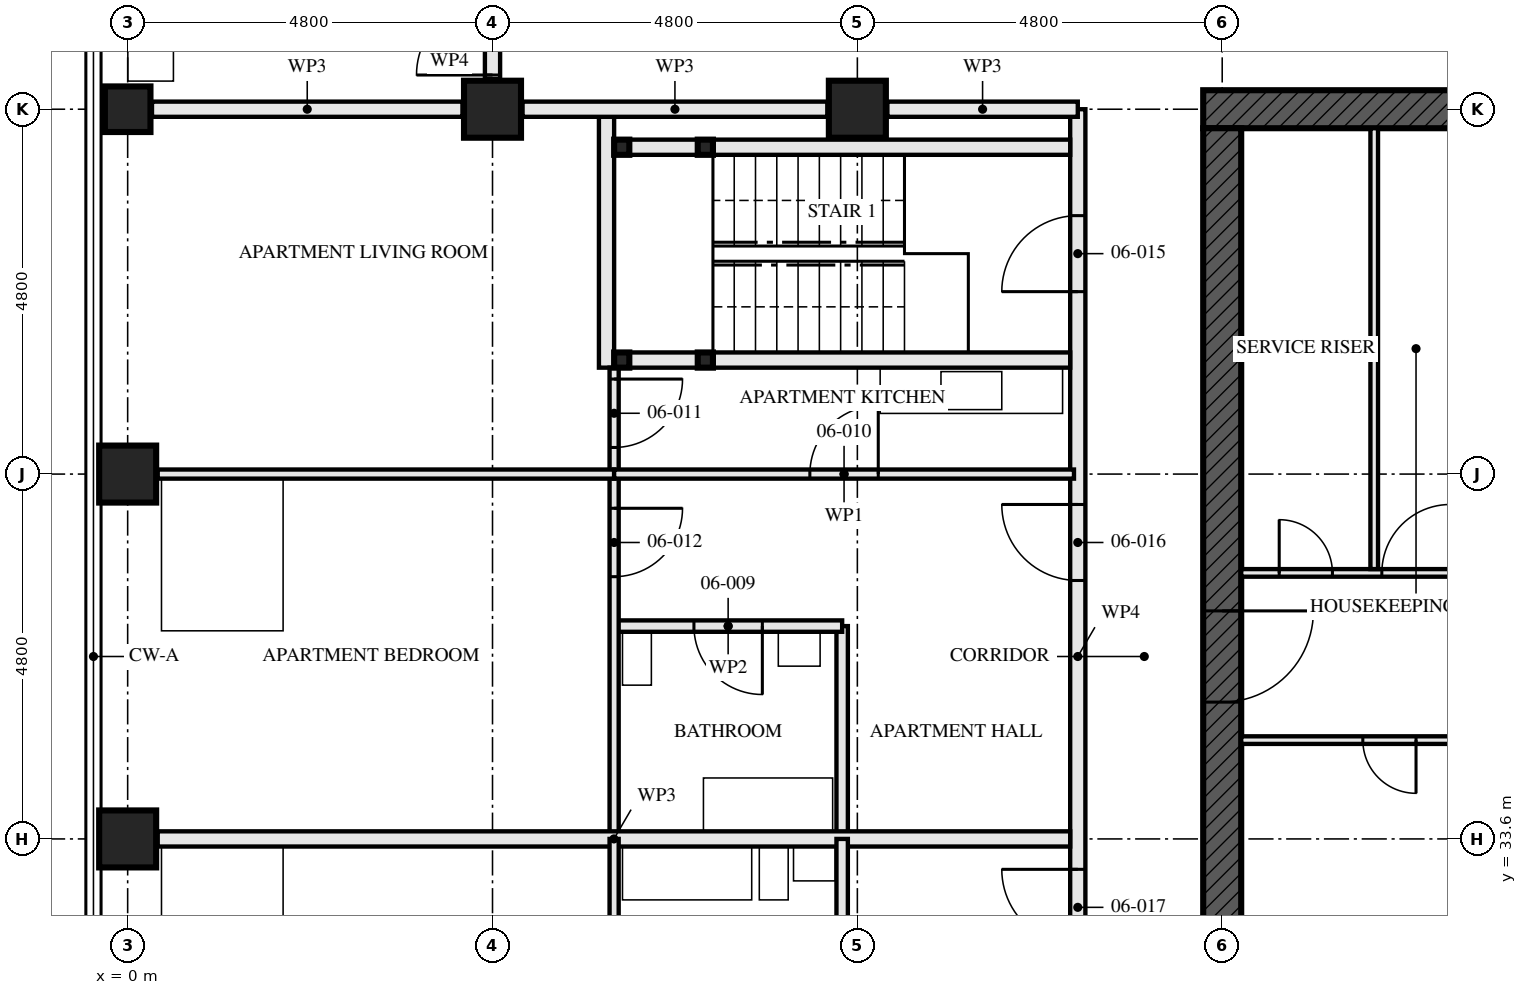
"""IFC4 building model, lengths in metres.
Left out: names, types, materials, properties, quantities, classifications, styles, units other than length and angle.
Written with IfcOpenShell. Run it as: python <this file> out.ifc"""

import sys

from ifc_helpers import new_model, si_unit, direction, frame, frame_2d, origin, origin_2d, place, context, subcontext, project, spatial, rectangle, hollow_rectangle, extrude, element, fill, save


model = new_model("IFC4")
c1 = context("Model", 3, precision=1e-05, world=origin(), true_north=direction((0.0, 1.0)))
c2 = subcontext(c1, "Body", "Model", "MODEL_VIEW")
j1 = project(units=[si_unit("LENGTHUNIT", "METRE"), si_unit("PLANEANGLEUNIT", "RADIAN")], contexts=[c1])
p1 = place(None, origin())
s1 = spatial("IfcSite", under=j1, at=p1, CompositionType="ELEMENT")
p2 = place(p1, origin())
s2 = spatial("IfcBuilding", under=s1, at=p2, CompositionType="ELEMENT")
p3 = place(p2, frame((0.0, 0.0, 27.0)))
s3 = spatial("IfcBuildingStorey", under=s2, at=p3, CompositionType="ELEMENT", Elevation=27.0)
for number, where, z_axis, x_axis in (
    (1, (0.0, 33.6, 0.0), (0.0, 0.0, 1.0), (1.0, 0.0, 0.0)),
    (2, (0.0, 38.4, 0.0), (0.0, 0.0, 1.0), (1.0, 0.0, 0.0)),
):
    element("IfcColumn", number, at=place(p3, frame(where, z_axis=z_axis, x_axis=x_axis)), inside=s3, PredefinedType="COLUMN", context=c2, shape_type="SweptSolid", body=[
        extrude(hollow_rectangle(XDim=0.75, YDim=0.75, WallThickness=0.08, at=origin_2d()), origin(), (0.0, 0.0, 1.0), 3.5),
    ])
p4 = place(p3, frame((0.0, 43.2, 0.0), z_axis=(0.0, 0.0, 1.0), x_axis=(0.0, 1.0, 0.0)))
e3 = element("IfcColumn", 3, at=p4, inside=s3, PredefinedType="COLUMN", context=c2, shape_type="SweptSolid", body=[
    extrude(hollow_rectangle(XDim=0.6, YDim=0.6, WallThickness=0.08, at=origin_2d()), origin(), (0.0, 0.0, 1.0), 3.5),
])
for number, where, z_axis, x_axis in (
    (4, (4.8, 43.2, 0.0), (0.0, 0.0, 1.0), (0.0, 1.0, 0.0)),
    (5, (9.6, 43.2, 0.0), (0.0, 0.0, 1.0), (0.0, 1.0, 0.0)),
):
    element("IfcColumn", number, at=place(p3, frame(where, z_axis=z_axis, x_axis=x_axis)), inside=s3, PredefinedType="COLUMN", context=c2, shape_type="SweptSolid", body=[
        extrude(hollow_rectangle(XDim=0.75, YDim=0.75, WallThickness=0.08, at=origin_2d()), origin(), (0.0, 0.0, 1.0), 3.5),
    ])
p5 = place(p3, frame((29.05, 43.2, -0.17), z_axis=(0.0, 0.0, 1.0), x_axis=(-1.0, 0.0, 0.0)))
e6 = element("IfcWall", 6, at=p5, inside=s3, PredefinedType="SHEAR", context=c2, shape_type="SweptSolid", body=[
    extrude(rectangle(XDim=14.9, YDim=0.5, at=frame_2d((7.45, 0.0))), origin(), (0.0, 0.0, 1.0), 3.5),
])
p6 = place(p5, frame((6.85, 0.0, 0.17)))
e7 = element("IfcOpeningElement", 7, at=p6, cuts=e6, PredefinedType="OPENING", context=c2, shape_type="SweptSolid", body=[
    extrude(rectangle(XDim=1.2, YDim=2.1, at=frame_2d((0.6, 1.05))), frame((0.0, 0.26, 0.0), z_axis=(0.0, -1.0, 0.0), x_axis=(1.0, 0.0, 0.0)), (0.0, 0.0, 1.0), 0.521),
])
p7 = place(p3, frame((14.4, 42.95, -0.17), z_axis=(0.0, 0.0, 1.0), x_axis=(0.0, -1.0, 0.0)))
e8 = element("IfcWall", 8, at=p7, inside=s3, PredefinedType="SHEAR", context=c2, shape_type="SweptSolid", body=[
    extrude(rectangle(XDim=13.9, YDim=0.5, at=frame_2d((6.95, 0.0))), origin(), (0.0, 0.0, 1.0), 3.5),
])
p8 = place(p7, frame((6.35, 0.0, 0.17)))
e9 = element("IfcOpeningElement", 9, at=p8, cuts=e8, PredefinedType="OPENING", context=c2, shape_type="SweptSolid", body=[
    extrude(rectangle(XDim=1.2, YDim=2.1, at=frame_2d((0.6, 1.05))), frame((0.0, 0.26, 0.0), z_axis=(0.0, -1.0, 0.0), x_axis=(1.0, 0.0, 0.0)), (0.0, 0.0, 1.0), 0.521),
])
for number, where, z_axis, x_axis in (
    (10, (6.5, 42.7, 0.0), (0.0, 0.0, 1.0), (1.0, 0.0, 0.0)),
    (11, (6.5, 39.9, 0.0), (0.0, 0.0, 1.0), (1.0, 0.0, 0.0)),
    (12, (7.6, 42.7, 0.0), (0.0, 0.0, 1.0), (1.0, 0.0, 0.0)),
    (13, (7.6, 39.9, 0.0), (0.0, 0.0, 1.0), (1.0, 0.0, 0.0)),
):
    element("IfcColumn", number, at=place(p3, frame(where, z_axis=z_axis, x_axis=x_axis)), inside=s3, PredefinedType="COLUMN", context=c2, shape_type="SweptSolid", body=[
        extrude(hollow_rectangle(XDim=0.2, YDim=0.2, WallThickness=0.008, at=origin_2d()), origin(), (0.0, 0.0, 1.0), 3.33),
    ])
p9 = place(p3, frame((6.6, 42.7, 0.0), z_axis=(0.0, 0.0, 1.0), x_axis=(1.0, 0.0, 0.0)))
e14 = element("IfcWall", 14, at=p9, inside=s3, PredefinedType="SOLIDWALL", context=c2, shape_type="SweptSolid", body=[
    extrude(rectangle(XDim=0.9, YDim=0.2, at=frame_2d((0.45, 0.0))), origin(), (0.0, 0.0, 1.0), 2.99),
])
p10 = place(p3, frame((7.7, 42.7, 0.0), z_axis=(0.0, 0.0, 1.0), x_axis=(1.0, 0.0, 0.0)))
e15 = element("IfcWall", 15, at=p10, inside=s3, PredefinedType="SOLIDWALL", context=c2, shape_type="SweptSolid", body=[
    extrude(rectangle(XDim=4.7, YDim=0.2, at=frame_2d((2.35, 0.0))), origin(), (0.0, 0.0, 1.0), 2.99),
])
p11 = place(p3, frame((6.6, 39.9, 0.0), z_axis=(0.0, 0.0, 1.0), x_axis=(1.0, 0.0, 0.0)))
e16 = element("IfcWall", 16, at=p11, inside=s3, PredefinedType="SOLIDWALL", context=c2, shape_type="SweptSolid", body=[
    extrude(rectangle(XDim=0.9, YDim=0.2, at=frame_2d((0.45, 0.0))), origin(), (0.0, 0.0, 1.0), 2.99),
])
p12 = place(p3, frame((7.7, 39.9, 0.0), z_axis=(0.0, 0.0, 1.0), x_axis=(1.0, 0.0, 0.0)))
e17 = element("IfcWall", 17, at=p12, inside=s3, PredefinedType="SOLIDWALL", context=c2, shape_type="SweptSolid", body=[
    extrude(rectangle(XDim=4.7, YDim=0.2, at=frame_2d((2.35, 0.0))), origin(), (0.0, 0.0, 1.0), 2.99),
])
p13 = place(p3, frame((6.3, 43.1, 0.0), z_axis=(0.0, 0.0, 1.0), x_axis=(0.0, -1.0, 0.0)))
e18 = element("IfcWall", 18, at=p13, inside=s3, PredefinedType="SOLIDWALL", context=c2, shape_type="SweptSolid", body=[
    extrude(rectangle(XDim=3.3, YDim=0.2, at=frame_2d((1.65, 0.0))), origin(), (0.0, 0.0, 1.0), 3.33),
])
p14 = place(p3, frame((6.4, 36.4, 0.0), z_axis=(0.0, 0.0, 1.0), x_axis=(1.0, 0.0, 0.0)))
e19 = element("IfcWall", 19, at=p14, inside=s3, PredefinedType="PARTITIONING", context=c2, shape_type="SweptSolid", body=[
    extrude(rectangle(XDim=3.0, YDim=0.15, at=frame_2d((1.5, 0.0))), origin(), (0.0, 0.0, 1.0), 3.33),
])
p15 = place(p14, frame((1.05, 0.0, 0.0)))
e20 = element("IfcOpeningElement", 20, at=p15, cuts=e19, PredefinedType="OPENING", context=c2, shape_type="SweptSolid", body=[
    extrude(rectangle(XDim=0.9, YDim=2.1, at=frame_2d((0.45, 1.05))), frame((0.0, 0.085, 0.0), z_axis=(0.0, -1.0, 0.0), x_axis=(1.0, 0.0, 0.0)), (0.0, 0.0, 1.0), 0.171),
])
p16 = place(p3, frame((9.4, 36.4, 0.0), z_axis=(0.0, 0.0, 1.0), x_axis=(0.0, -1.0, 0.0)))
e21 = element("IfcWall", 21, at=p16, inside=s3, PredefinedType="PARTITIONING", context=c2, shape_type="SweptSolid", body=[
    extrude(rectangle(XDim=2.8, YDim=0.15, at=frame_2d((1.4, 0.0))), origin(), (0.0, 0.0, 1.0), 3.33),
])
p17 = place(p3, frame((6.4, 38.4, 0.0), z_axis=(0.0, 0.0, 1.0), x_axis=(1.0, 0.0, 0.0)))
e22 = element("IfcWall", 22, at=p17, inside=s3, PredefinedType="PARTITIONING", context=c2, shape_type="SweptSolid", body=[
    extrude(rectangle(XDim=6.05, YDim=0.12, at=frame_2d((3.025, 0.0))), origin(), (0.0, 0.0, 1.0), 2.55),
])
p18 = place(p17, frame((2.575, 0.0, 0.0)))
e23 = element("IfcOpeningElement", 23, at=p18, cuts=e22, PredefinedType="OPENING", context=c2, shape_type="SweptSolid", body=[
    extrude(rectangle(XDim=0.9, YDim=2.1, at=frame_2d((0.45, 1.05))), frame((0.0, 0.071, 0.0), z_axis=(0.0, -1.0, 0.0), x_axis=(1.0, 0.0, 0.0)), (0.0, 0.0, 1.0), 0.141),
])
p19 = place(p3, frame((6.4, 39.8, 0.0), z_axis=(0.0, 0.0, 1.0), x_axis=(0.0, -1.0, 0.0)))
e24 = element("IfcWall", 24, at=p19, inside=s3, PredefinedType="PARTITIONING", context=c2, shape_type="SweptSolid", body=[
    extrude(rectangle(XDim=1.4, YDim=0.12, at=frame_2d((0.7, 0.0))), origin(), (0.0, 0.0, 1.0), 3.33),
])
p20 = place(p19, frame((0.15, 0.0, 0.0)))
e25 = element("IfcOpeningElement", 25, at=p20, cuts=e24, PredefinedType="OPENING", context=c2, shape_type="SweptSolid", body=[
    extrude(rectangle(XDim=0.9, YDim=2.1, at=frame_2d((0.45, 1.05))), frame((0.0, 0.071, 0.0), z_axis=(0.0, -1.0, 0.0), x_axis=(1.0, 0.0, 0.0)), (0.0, 0.0, 1.0), 0.141),
])
p21 = place(p3, frame((6.4, 38.4, 0.0), z_axis=(0.0, 0.0, 1.0), x_axis=(0.0, -1.0, 0.0)))
e26 = element("IfcWall", 26, at=p21, inside=s3, PredefinedType="PARTITIONING", context=c2, shape_type="SweptSolid", body=[
    extrude(rectangle(XDim=4.8, YDim=0.12, at=frame_2d((2.4, 0.0))), origin(), (0.0, 0.0, 1.0), 3.33),
])
p22 = place(p21, frame((0.45, 0.0, 0.0)))
e27 = element("IfcOpeningElement", 27, at=p22, cuts=e26, PredefinedType="OPENING", context=c2, shape_type="SweptSolid", body=[
    extrude(rectangle(XDim=0.9, YDim=2.1, at=frame_2d((0.45, 1.05))), frame((0.0, 0.071, 0.0), z_axis=(0.0, -1.0, 0.0), x_axis=(1.0, 0.0, 0.0)), (0.0, 0.0, 1.0), 0.141),
])
p23 = place(p3, frame((0.395, 38.4, 0.0), z_axis=(0.0, 0.0, 1.0), x_axis=(1.0, 0.0, 0.0)))
e28 = element("IfcWall", 28, at=p23, inside=s3, PredefinedType="PARTITIONING", context=c2, shape_type="SweptSolid", body=[
    extrude(rectangle(XDim=6.005, YDim=0.12, at=frame_2d((3.002, 0.0))), origin(), (0.0, 0.0, 1.0), 2.55),
])
p24 = place(p3, frame((0.395, 33.6, 0.0), z_axis=(0.0, 0.0, 1.0), x_axis=(1.0, 0.0, 0.0)))
e29 = element("IfcWall", 29, at=p24, inside=s3, PredefinedType="PARTITIONING", context=c2, shape_type="SweptSolid", body=[
    extrude(rectangle(XDim=12.005, YDim=0.2, at=frame_2d((6.002, 0.0))), origin(), (0.0, 0.0, 1.0), 2.55),
])
p25 = place(p3, frame((9.4, 33.6, 0.0), z_axis=(0.0, 0.0, 1.0), x_axis=(0.0, -1.0, 0.0)))
e30 = element("IfcWall", 30, at=p25, inside=s3, PredefinedType="PARTITIONING", context=c2, shape_type="SweptSolid", body=[
    extrude(rectangle(XDim=2.8, YDim=0.15, at=frame_2d((1.4, 0.0))), origin(), (0.0, 0.0, 1.0), 3.33),
])
p26 = place(p3, frame((6.4, 33.6, 0.0), z_axis=(0.0, 0.0, 1.0), x_axis=(0.0, -1.0, 0.0)))
e31 = element("IfcWall", 31, at=p26, inside=s3, PredefinedType="PARTITIONING", context=c2, shape_type="SweptSolid", body=[
    extrude(rectangle(XDim=4.8, YDim=0.12, at=frame_2d((2.4, 0.0))), origin(), (0.0, 0.0, 1.0), 3.33),
])
p27 = place(p26, frame((3.45, 0.0, 0.0)))
e32 = element("IfcOpeningElement", 32, at=p27, cuts=e31, PredefinedType="OPENING", context=c2, shape_type="SweptSolid", body=[
    extrude(rectangle(XDim=0.9, YDim=2.1, at=frame_2d((0.45, 1.05))), frame((0.0, 0.071, 0.0), z_axis=(0.0, -1.0, 0.0), x_axis=(1.0, 0.0, 0.0)), (0.0, 0.0, 1.0), 0.141),
])
p28 = place(p3, frame((12.5, 43.2, 0.0), z_axis=(0.0, 0.0, 1.0), x_axis=(0.0, -1.0, 0.0)))
e33 = element("IfcWall", 33, at=p28, inside=s3, PredefinedType="PARTITIONING", context=c2, shape_type="SweptSolid", body=[
    extrude(rectangle(XDim=14.4, YDim=0.2, at=frame_2d((7.2, 0.0))), origin(), (0.0, 0.0, 1.0), 2.55),
])
p29 = place(p28, frame((1.4, 0.0, 0.0)))
e34 = element("IfcOpeningElement", 34, at=p29, cuts=e33, PredefinedType="OPENING", context=c2, shape_type="SweptSolid", body=[
    extrude(rectangle(XDim=1.0, YDim=2.1, at=frame_2d((0.5, 1.05))), frame((0.0, 0.111, 0.0), z_axis=(0.0, -1.0, 0.0), x_axis=(1.0, 0.0, 0.0)), (0.0, 0.0, 1.0), 0.221),
])
p30 = place(p28, frame((5.2, 0.0, 0.0)))
e35 = element("IfcOpeningElement", 35, at=p30, cuts=e33, PredefinedType="OPENING", context=c2, shape_type="SweptSolid", body=[
    extrude(rectangle(XDim=1.0, YDim=2.1, at=frame_2d((0.5, 1.05))), frame((0.0, 0.111, 0.0), z_axis=(0.0, -1.0, 0.0), x_axis=(1.0, 0.0, 0.0)), (0.0, 0.0, 1.0), 0.221),
])
p31 = place(p28, frame((10.0, 0.0, 0.0)))
e36 = element("IfcOpeningElement", 36, at=p31, cuts=e33, PredefinedType="OPENING", context=c2, shape_type="SweptSolid", body=[
    extrude(rectangle(XDim=1.0, YDim=2.1, at=frame_2d((0.5, 1.05))), frame((0.0, 0.111, 0.0), z_axis=(0.0, -1.0, 0.0), x_axis=(1.0, 0.0, 0.0)), (0.0, 0.0, 1.0), 0.221),
])
p32 = place(p3, frame((4.8, 45.2, 0.0), z_axis=(0.0, 0.0, 1.0), x_axis=(0.0, -1.0, 0.0)))
e37 = element("IfcWall", 37, at=p32, inside=s3, PredefinedType="PARTITIONING", context=c2, shape_type="SweptSolid", body=[
    extrude(rectangle(XDim=1.605, YDim=0.2, at=frame_2d((0.802, 0.0))), origin(), (0.0, 0.0, 1.0), 3.33),
])
p33 = place(p32, frame((0.55, 0.0, 0.0)))
e38 = element("IfcOpeningElement", 38, at=p33, cuts=e37, PredefinedType="OPENING", context=c2, shape_type="SweptSolid", body=[
    extrude(rectangle(XDim=1.0, YDim=2.1, at=frame_2d((0.5, 1.05))), frame((0.0, 0.111, 0.0), z_axis=(0.0, -1.0, 0.0), x_axis=(1.0, 0.0, 0.0)), (0.0, 0.0, 1.0), 0.221),
])
p34 = place(p3, frame((16.4, 37.15, 0.0), z_axis=(0.0, 0.0, 1.0), x_axis=(0.0, 1.0, 0.0)))
e39 = element("IfcWall", 39, at=p34, inside=s3, PredefinedType="SOLIDWALL", context=c2, shape_type="SweptSolid", body=[
    extrude(rectangle(XDim=5.8, YDim=0.1, at=frame_2d((2.9, 0.0))), origin(), (0.0, 0.0, 1.0), 3.33),
])
p35 = place(p3, frame((14.65, 34.9, 0.0), z_axis=(0.0, 0.0, 1.0), x_axis=(1.0, 0.0, 0.0)))
e40 = element("IfcWall", 40, at=p35, inside=s3, PredefinedType="SOLIDWALL", context=c2, shape_type="SweptSolid", body=[
    extrude(rectangle(XDim=5.9, YDim=0.1, at=frame_2d((2.95, 0.0))), origin(), (0.0, 0.0, 1.0), 3.33),
])
p36 = place(p35, frame((1.6, 0.0, 0.0)))
e41 = element("IfcOpeningElement", 41, at=p36, cuts=e40, PredefinedType="OPENING", context=c2, shape_type="SweptSolid", body=[
    extrude(rectangle(XDim=0.7, YDim=2.1, at=frame_2d((0.35, 1.05))), frame((0.0, 0.061, 0.0), z_axis=(0.0, -1.0, 0.0), x_axis=(1.0, 0.0, 0.0)), (0.0, 0.0, 1.0), 0.121),
])
p37 = place(p3, frame((14.65, 37.1, 0.0), z_axis=(0.0, 0.0, 1.0), x_axis=(1.0, 0.0, 0.0)))
e42 = element("IfcWall", 42, at=p37, inside=s3, PredefinedType="SOLIDWALL", context=c2, shape_type="SweptSolid", body=[
    extrude(rectangle(XDim=5.9, YDim=0.1, at=frame_2d((2.95, 0.0))), origin(), (0.0, 0.0, 1.0), 3.33),
])
p38 = place(p37, frame((0.5, 0.0, 0.0)))
e43 = element("IfcOpeningElement", 43, at=p38, cuts=e42, PredefinedType="OPENING", context=c2, shape_type="SweptSolid", body=[
    extrude(rectangle(XDim=0.7, YDim=2.1, at=frame_2d((0.35, 1.05))), frame((0.0, 0.061, 0.0), z_axis=(0.0, -1.0, 0.0), x_axis=(1.0, 0.0, 0.0)), (0.0, 0.0, 1.0), 0.121),
])
p39 = place(p37, frame((1.85, 0.0, 0.0)))
e44 = element("IfcOpeningElement", 44, at=p39, cuts=e42, PredefinedType="OPENING", context=c2, shape_type="SweptSolid", body=[
    extrude(rectangle(XDim=0.9, YDim=2.1, at=frame_2d((0.45, 1.05))), frame((0.0, 0.061, 0.0), z_axis=(0.0, -1.0, 0.0), x_axis=(1.0, 0.0, 0.0)), (0.0, 0.0, 1.0), 0.121),
])
p40 = place(p3, frame((12.5, 43.2, 0.0), z_axis=(0.0, 0.0, 1.0), x_axis=(-1.0, 0.0, 0.0)))
e45 = element("IfcWall", 45, at=p40, inside=s3, PredefinedType="PARTITIONING", context=c2, shape_type="SweptSolid", body=[
    extrude(rectangle(XDim=2.505, YDim=0.2, at=frame_2d((1.252, 0.0))), origin(), (0.0, 0.0, 1.0), 2.32),
])
p41 = place(p3, frame((9.205, 43.2, 0.0), z_axis=(0.0, 0.0, 1.0), x_axis=(-1.0, 0.0, 0.0)))
e46 = element("IfcWall", 46, at=p41, inside=s3, PredefinedType="PARTITIONING", context=c2, shape_type="SweptSolid", body=[
    extrude(rectangle(XDim=4.01, YDim=0.2, at=frame_2d((2.005, 0.0))), origin(), (0.0, 0.0, 1.0), 2.32),
])
p42 = place(p3, frame((4.405, 43.2, 0.0), z_axis=(0.0, 0.0, 1.0), x_axis=(-1.0, 0.0, 0.0)))
e47 = element("IfcWall", 47, at=p42, inside=s3, PredefinedType="PARTITIONING", context=c2, shape_type="SweptSolid", body=[
    extrude(rectangle(XDim=4.085, YDim=0.2, at=frame_2d((2.042, 0.0))), origin(), (0.0, 0.0, 1.0), 2.32),
])
p43 = place(p15, frame((0.9, 0.0, 0.0), z_axis=(0.0, 0.0, 1.0), x_axis=(-1.0, 0.0, 0.0)))
e48 = element("IfcDoor", 48, at=p43, inside=s3, OperationType="SINGLE_SWING_RIGHT", PredefinedType="DOOR", context=c2, shape_type="SweptSolid", body=[
    extrude(rectangle(XDim=0.9, YDim=2.1, at=frame_2d((0.45, 1.05))), frame((0.0, 0.022, 0.0), z_axis=(0.0, -1.0, 0.0), x_axis=(1.0, 0.0, 0.0)), (0.0, 0.0, 1.0), 0.044),
])
fill(e20, e48)
p44 = place(p18, origin())
e49 = element("IfcDoor", 49, at=p44, inside=s3, OperationType="SINGLE_SWING_LEFT", PredefinedType="DOOR", context=c2, shape_type="SweptSolid", body=[
    extrude(rectangle(XDim=0.9, YDim=2.1, at=frame_2d((0.45, 1.05))), frame((0.0, 0.022, 0.0), z_axis=(0.0, -1.0, 0.0), x_axis=(1.0, 0.0, 0.0)), (0.0, 0.0, 1.0), 0.044),
])
fill(e23, e49)
p45 = place(p20, origin())
e50 = element("IfcDoor", 50, at=p45, inside=s3, OperationType="SINGLE_SWING_RIGHT", PredefinedType="DOOR", context=c2, shape_type="SweptSolid", body=[
    extrude(rectangle(XDim=0.9, YDim=2.1, at=frame_2d((0.45, 1.05))), frame((0.0, 0.022, 0.0), z_axis=(0.0, -1.0, 0.0), x_axis=(1.0, 0.0, 0.0)), (0.0, 0.0, 1.0), 0.044),
])
fill(e25, e50)
p46 = place(p22, origin())
e51 = element("IfcDoor", 51, at=p46, inside=s3, OperationType="SINGLE_SWING_RIGHT", PredefinedType="DOOR", context=c2, shape_type="SweptSolid", body=[
    extrude(rectangle(XDim=0.9, YDim=2.1, at=frame_2d((0.45, 1.05))), frame((0.0, 0.022, 0.0), z_axis=(0.0, -1.0, 0.0), x_axis=(1.0, 0.0, 0.0)), (0.0, 0.0, 1.0), 0.044),
])
fill(e27, e51)
p47 = place(p29, frame((1.0, 0.0, 0.0), z_axis=(0.0, 0.0, 1.0), x_axis=(-1.0, 0.0, 0.0)))
e52 = element("IfcDoor", 52, at=p47, inside=s3, OperationType="SINGLE_SWING_RIGHT", PredefinedType="DOOR", context=c2, shape_type="SweptSolid", body=[
    extrude(rectangle(XDim=1.0, YDim=2.1, at=frame_2d((0.5, 1.05))), frame((0.0, 0.032, 0.0), z_axis=(0.0, -1.0, 0.0), x_axis=(1.0, 0.0, 0.0)), (0.0, 0.0, 1.0), 0.064),
])
fill(e34, e52)
p48 = place(p30, frame((1.0, 0.0, 0.0), z_axis=(0.0, 0.0, 1.0), x_axis=(-1.0, 0.0, 0.0)))
e53 = element("IfcDoor", 53, at=p48, inside=s3, OperationType="SINGLE_SWING_LEFT", PredefinedType="DOOR", context=c2, shape_type="SweptSolid", body=[
    extrude(rectangle(XDim=1.0, YDim=2.1, at=frame_2d((0.5, 1.05))), frame((0.0, 0.027, 0.0), z_axis=(0.0, -1.0, 0.0), x_axis=(1.0, 0.0, 0.0)), (0.0, 0.0, 1.0), 0.054),
])
fill(e35, e53)
p49 = place(p31, frame((1.0, 0.0, 0.0), z_axis=(0.0, 0.0, 1.0), x_axis=(-1.0, 0.0, 0.0)))
e54 = element("IfcDoor", 54, at=p49, inside=s3, OperationType="SINGLE_SWING_LEFT", PredefinedType="DOOR", context=c2, shape_type="SweptSolid", body=[
    extrude(rectangle(XDim=1.0, YDim=2.1, at=frame_2d((0.5, 1.05))), frame((0.0, 0.027, 0.0), z_axis=(0.0, -1.0, 0.0), x_axis=(1.0, 0.0, 0.0)), (0.0, 0.0, 1.0), 0.054),
])
fill(e36, e54)
p50 = place(p33, frame((1.0, 0.0, 0.0), z_axis=(0.0, 0.0, 1.0), x_axis=(-1.0, 0.0, 0.0)))
e55 = element("IfcDoor", 55, at=p50, inside=s3, OperationType="SINGLE_SWING_RIGHT", PredefinedType="DOOR", context=c2, shape_type="SweptSolid", body=[
    extrude(rectangle(XDim=1.0, YDim=2.1, at=frame_2d((0.5, 1.05))), frame((0.0, 0.027, 0.0), z_axis=(0.0, -1.0, 0.0), x_axis=(1.0, 0.0, 0.0)), (0.0, 0.0, 1.0), 0.054),
])
fill(e38, e55)
p51 = place(p36, frame((0.7, 0.0, 0.0), z_axis=(0.0, 0.0, 1.0), x_axis=(-1.0, 0.0, 0.0)))
e56 = element("IfcDoor", 56, at=p51, inside=s3, OperationType="SINGLE_SWING_RIGHT", PredefinedType="DOOR", context=c2, shape_type="SweptSolid", body=[
    extrude(rectangle(XDim=0.7, YDim=2.1, at=frame_2d((0.35, 1.05))), frame((0.0, 0.027, 0.0), z_axis=(0.0, -1.0, 0.0), x_axis=(1.0, 0.0, 0.0)), (0.0, 0.0, 1.0), 0.054),
])
fill(e41, e56)
p52 = place(p38, origin())
e57 = element("IfcDoor", 57, at=p52, inside=s3, OperationType="SINGLE_SWING_RIGHT", PredefinedType="DOOR", context=c2, shape_type="SweptSolid", body=[
    extrude(rectangle(XDim=0.7, YDim=2.1, at=frame_2d((0.35, 1.05))), frame((0.0, 0.027, 0.0), z_axis=(0.0, -1.0, 0.0), x_axis=(1.0, 0.0, 0.0)), (0.0, 0.0, 1.0), 0.054),
])
fill(e43, e57)
p53 = place(p39, origin())
e58 = element("IfcDoor", 58, at=p53, inside=s3, OperationType="SINGLE_SWING_LEFT", PredefinedType="DOOR", context=c2, shape_type="SweptSolid", body=[
    extrude(rectangle(XDim=0.9, YDim=2.1, at=frame_2d((0.45, 1.05))), frame((0.0, 0.027, 0.0), z_axis=(0.0, -1.0, 0.0), x_axis=(1.0, 0.0, 0.0)), (0.0, 0.0, 1.0), 0.054),
])
fill(e44, e58)
p54 = place(p8, origin())
e59 = element("IfcDoor", 59, at=p54, inside=s3, OperationType="SINGLE_SWING_LEFT", PredefinedType="DOOR", context=c2, shape_type="SweptSolid", body=[
    extrude(rectangle(XDim=1.2, YDim=2.1, at=frame_2d((0.6, 1.05))), frame((0.0, 0.027, 0.0), z_axis=(0.0, -1.0, 0.0), x_axis=(1.0, 0.0, 0.0)), (0.0, 0.0, 1.0), 0.054),
])
fill(e9, e59)
save(model, sys.argv[1])
